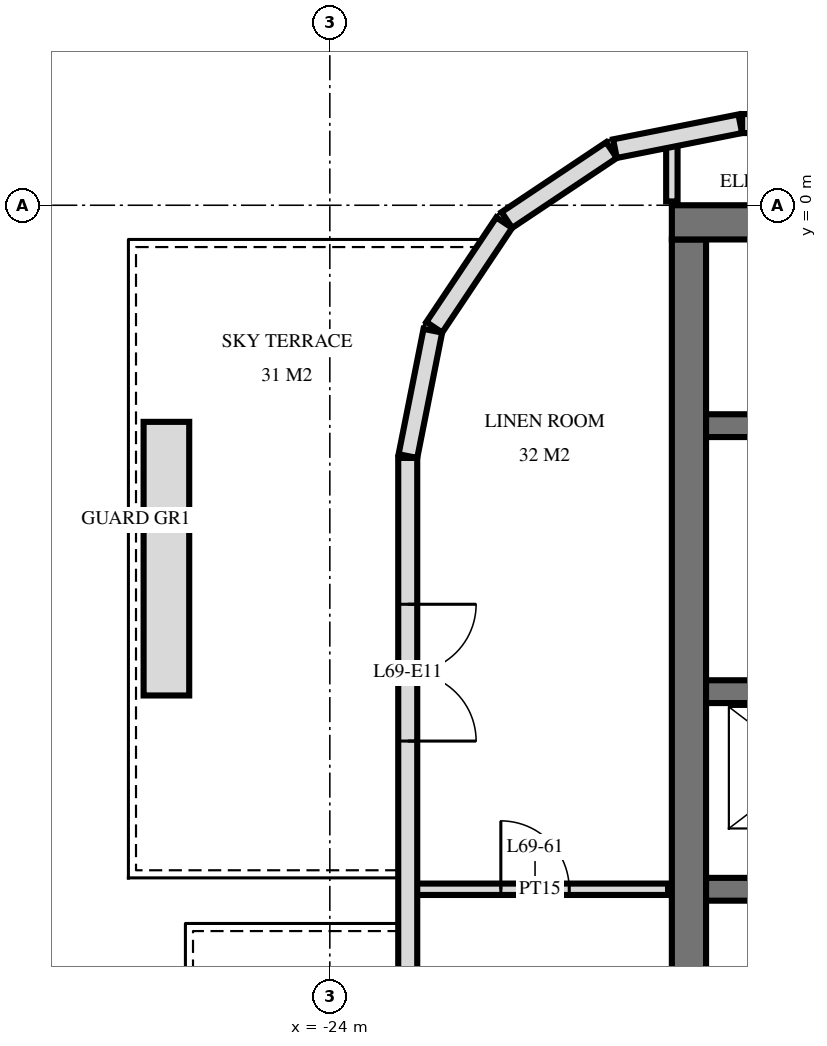
"""IFC4 building model, lengths in metres.
Left out: names, types, materials, properties, quantities, classifications, styles, units other than length and angle.
Written with IfcOpenShell. Run it as: python <this file> out.ifc"""

import sys

from ifc_helpers import new_model, si_unit, direction, frame, frame_2d, origin, place, context, subcontext, project, spatial, rectangle, extrude, element, fill, save


model = new_model("IFC4")
c1 = context("Model", 3, precision=1e-05, world=origin(), true_north=direction((0.0, 1.0)))
c2 = subcontext(c1, "Body", "Model", "MODEL_VIEW")
j1 = project(units=[si_unit("LENGTHUNIT", "METRE"), si_unit("PLANEANGLEUNIT", "RADIAN")], contexts=[c1])
p1 = place(None, origin())
s1 = spatial("IfcSite", under=j1, at=p1, CompositionType="ELEMENT")
p2 = place(p1, origin())
s2 = spatial("IfcBuilding", under=s1, at=p2, CompositionType="ELEMENT")
p3 = place(p2, frame((0.0, 0.0, 263.1)))
s3 = spatial("IfcBuildingStorey", under=s2, at=p3, CompositionType="ELEMENT", Elevation=263.1)
p4 = place(p3, frame((-19.5, -0.225, 0.0), z_axis=(0.0, 0.0, 1.0), x_axis=(1.0, 0.0, 0.0)))
e1 = element("IfcWall", 1, at=p4, inside=s3, PredefinedType="SHEAR", context=c2, shape_type="SweptSolid", body=[
    extrude(rectangle(XDim=9.5, YDim=0.45, at=frame_2d((4.75, 0.0))), origin(), (0.0, 0.0, 1.0), 3.5),
])
p5 = place(p3, frame((-19.275, -14.55, 0.0), z_axis=(0.0, 0.0, 1.0), x_axis=(0.0, 1.0, 0.0)))
e2 = element("IfcWall", 2, at=p5, inside=s3, PredefinedType="SHEAR", context=c2, shape_type="SweptSolid", body=[
    extrude(rectangle(XDim=14.1, YDim=0.45, at=frame_2d((7.05, 0.0))), origin(), (0.0, 0.0, 1.0), 3.5),
])
p6 = place(p3, frame((-19.05, -2.9, 0.0), z_axis=(0.0, 0.0, 1.0), x_axis=(1.0, 0.0, 0.0)))
e3 = element("IfcWall", 3, at=p6, inside=s3, PredefinedType="SHEAR", context=c2, shape_type="SweptSolid", body=[
    extrude(rectangle(XDim=8.7, YDim=0.3, at=frame_2d((4.35, 0.0))), origin(), (0.0, 0.0, 1.0), 3.5),
])
p7 = place(p6, frame((6.8, 0.0, 0.0)))
e4 = element("IfcOpeningElement", 4, at=p7, cuts=e3, PredefinedType="OPENING", context=c2, shape_type="SweptSolid", body=[
    extrude(rectangle(XDim=1.1, YDim=2.1, at=frame_2d((0.55, 1.05))), frame((0.0, 0.16, 0.0), z_axis=(0.0, -1.0, 0.0), x_axis=(1.0, 0.0, 0.0)), (0.0, 0.0, 1.0), 0.32),
])
p8 = place(p6, frame((3.8, 0.0, 0.0)))
e5 = element("IfcOpeningElement", 5, at=p8, cuts=e3, PredefinedType="OPENING", context=c2, shape_type="SweptSolid", body=[
    extrude(rectangle(XDim=1.1, YDim=2.1, at=frame_2d((0.55, 1.05))), frame((0.0, 0.16, 0.0), z_axis=(0.0, -1.0, 0.0), x_axis=(1.0, 0.0, 0.0)), (0.0, 0.0, 1.0), 0.32),
])
p9 = place(p6, frame((0.9, 0.0, 0.0)))
e6 = element("IfcOpeningElement", 6, at=p9, cuts=e3, PredefinedType="OPENING", context=c2, shape_type="SweptSolid", body=[
    extrude(rectangle(XDim=0.9, YDim=2.1, at=frame_2d((0.45, 1.05))), frame((0.0, 0.16, 0.0), z_axis=(0.0, -1.0, 0.0), x_axis=(1.0, 0.0, 0.0)), (0.0, 0.0, 1.0), 0.32),
])
p10 = place(p3, frame((-19.05, -6.4, 0.0), z_axis=(0.0, 0.0, 1.0), x_axis=(1.0, 0.0, 0.0)))
e7 = element("IfcWall", 7, at=p10, inside=s3, PredefinedType="SHEAR", context=c2, shape_type="SweptSolid", body=[
    extrude(rectangle(XDim=8.7, YDim=0.3, at=frame_2d((4.35, 0.0))), origin(), (0.0, 0.0, 1.0), 3.5),
])
p11 = place(p10, frame((0.8, 0.0, 0.0)))
e8 = element("IfcOpeningElement", 8, at=p11, cuts=e7, PredefinedType="OPENING", context=c2, shape_type="SweptSolid", body=[
    extrude(rectangle(XDim=1.1, YDim=2.1, at=frame_2d((0.55, 1.05))), frame((0.0, 0.16, 0.0), z_axis=(0.0, -1.0, 0.0), x_axis=(1.0, 0.0, 0.0)), (0.0, 0.0, 1.0), 0.32),
])
p12 = place(p3, frame((-19.05, -9.0, 0.0), z_axis=(0.0, 0.0, 1.0), x_axis=(1.0, 0.0, 0.0)))
e9 = element("IfcWall", 9, at=p12, inside=s3, PredefinedType="SHEAR", context=c2, shape_type="SweptSolid", body=[
    extrude(rectangle(XDim=8.7, YDim=0.3, at=frame_2d((4.35, 0.0))), origin(), (0.0, 0.0, 1.0), 3.5),
])
p13 = place(p12, frame((3.8, 0.0, 0.0)))
e10 = element("IfcOpeningElement", 10, at=p13, cuts=e9, PredefinedType="OPENING", context=c2, shape_type="SweptSolid", body=[
    extrude(rectangle(XDim=1.1, YDim=2.1, at=frame_2d((0.55, 1.05))), frame((0.0, 0.16, 0.0), z_axis=(0.0, -1.0, 0.0), x_axis=(1.0, 0.0, 0.0)), (0.0, 0.0, 1.0), 0.32),
])
p14 = place(p3, frame((18.575, 1.075, 0.0), z_axis=(0.0, 0.0, 1.0), x_axis=(-1.0, 0.0, 0.0)))
e11 = element("IfcWall", 11, at=p14, inside=s3, PredefinedType="SOLIDWALL", context=c2, shape_type="SweptSolid", body=[
    extrude(rectangle(XDim=37.151, YDim=0.25, at=frame_2d((18.575, 0.0))), origin(), (0.0, 0.0, 1.0), 3.22),
])
p15 = place(p14, frame((9.275, 0.0, 0.9)))
e12 = element("IfcOpeningElement", 12, at=p15, cuts=e11, PredefinedType="OPENING", context=c2, shape_type="SweptSolid", body=[
    extrude(rectangle(XDim=2.4, YDim=1.5, at=frame_2d((1.2, 0.75))), frame((0.0, 0.135, 0.0), z_axis=(0.0, -1.0, 0.0), x_axis=(1.0, 0.0, 0.0)), (0.0, 0.0, 1.0), 0.27),
])
p16 = place(p14, frame((15.275, 0.0, 0.9)))
e13 = element("IfcOpeningElement", 13, at=p16, cuts=e11, PredefinedType="OPENING", context=c2, shape_type="SweptSolid", body=[
    extrude(rectangle(XDim=2.4, YDim=1.5, at=frame_2d((1.2, 0.75))), frame((0.0, 0.135, 0.0), z_axis=(0.0, -1.0, 0.0), x_axis=(1.0, 0.0, 0.0)), (0.0, 0.0, 1.0), 0.27),
])
p17 = place(p14, frame((25.125, 0.0, 0.9)))
e14 = element("IfcOpeningElement", 14, at=p17, cuts=e11, PredefinedType="OPENING", context=c2, shape_type="SweptSolid", body=[
    extrude(rectangle(XDim=2.4, YDim=1.5, at=frame_2d((1.2, 0.75))), frame((0.0, 0.135, 0.0), z_axis=(0.0, -1.0, 0.0), x_axis=(1.0, 0.0, 0.0)), (0.0, 0.0, 1.0), 0.27),
])
p18 = place(p3, frame((-18.6, 1.073, 0.0), z_axis=(0.0, 0.0, 1.0), x_axis=(-0.980797896849, -0.195026884138, 0.0)))
e15 = element("IfcWall", 15, at=p18, inside=s3, PredefinedType="SOLIDWALL", context=c2, shape_type="SweptSolid", body=[
    extrude(rectangle(XDim=1.681, YDim=0.25, at=frame_2d((0.841, 0.0))), origin(), (0.0, 0.0, 1.0), 3.22),
])
for number, where, z_axis, x_axis in (
    (16, (-20.294, 0.726, 0.0), (0.0, 0.0, 1.0), (-0.831, -0.556, 0.0)),
    (17, (-21.706, -0.229, 0.0), (0.0, 0.0, 1.0), (-0.556, -0.831, 0.0)),
):
    element("IfcWall", number, at=place(p3, frame(where, z_axis=z_axis, x_axis=x_axis)), inside=s3, PredefinedType="SOLIDWALL", context=c2, shape_type="SweptSolid", body=[
        extrude(rectangle(XDim=1.656, YDim=0.25, at=frame_2d((0.828, 0.0))), origin(), (0.0, 0.0, 1.0), 3.22),
    ])
p19 = place(p3, frame((-22.645, -1.651, 0.0), z_axis=(0.0, 0.0, 1.0), x_axis=(-0.19513878023, -0.980775640221, 0.0)))
e18 = element("IfcWall", 18, at=p19, inside=s3, PredefinedType="SOLIDWALL", context=c2, shape_type="SweptSolid", body=[
    extrude(rectangle(XDim=1.681, YDim=0.25, at=frame_2d((0.841, 0.0))), origin(), (0.0, 0.0, 1.0), 3.22),
])
p20 = place(p3, frame((-22.975, -3.325, 0.0), z_axis=(0.0, 0.0, 1.0), x_axis=(0.0, -1.0, 0.0)))
e19 = element("IfcWall", 19, at=p20, inside=s3, PredefinedType="SOLIDWALL", context=c2, shape_type="SweptSolid", body=[
    extrude(rectangle(XDim=25.951, YDim=0.25, at=frame_2d((12.975, 0.0))), origin(), (0.0, 0.0, 1.0), 3.22),
])
p21 = place(p20, frame((1.925, 0.0, 0.0)))
e20 = element("IfcOpeningElement", 20, at=p21, cuts=e19, PredefinedType="OPENING", context=c2, shape_type="SweptSolid", body=[
    extrude(rectangle(XDim=1.8, YDim=2.4, at=frame_2d((0.9, 1.2))), frame((0.0, 0.135, 0.0), z_axis=(0.0, -1.0, 0.0), x_axis=(1.0, 0.0, 0.0)), (0.0, 0.0, 1.0), 0.27),
])
p22 = place(p20, frame((7.975, 0.0, 0.0)))
e21 = element("IfcOpeningElement", 21, at=p22, cuts=e19, PredefinedType="OPENING", context=c2, shape_type="SweptSolid", body=[
    extrude(rectangle(XDim=1.8, YDim=2.4, at=frame_2d((0.9, 1.2))), frame((0.0, 0.135, 0.0), z_axis=(0.0, -1.0, 0.0), x_axis=(1.0, 0.0, 0.0)), (0.0, 0.0, 1.0), 0.27),
])
p23 = place(p20, frame((12.575, 0.0, 0.9)))
e22 = element("IfcOpeningElement", 22, at=p23, cuts=e19, PredefinedType="OPENING", context=c2, shape_type="SweptSolid", body=[
    extrude(rectangle(XDim=1.2, YDim=1.5, at=frame_2d((0.6, 0.75))), frame((0.0, 0.135, 0.0), z_axis=(0.0, -1.0, 0.0), x_axis=(1.0, 0.0, 0.0)), (0.0, 0.0, 1.0), 0.27),
])
p24 = place(p20, frame((15.775, 0.0, 0.0)))
e23 = element("IfcOpeningElement", 23, at=p24, cuts=e19, PredefinedType="OPENING", context=c2, shape_type="SweptSolid", body=[
    extrude(rectangle(XDim=1.8, YDim=2.4, at=frame_2d((0.9, 1.2))), frame((0.0, 0.135, 0.0), z_axis=(0.0, -1.0, 0.0), x_axis=(1.0, 0.0, 0.0)), (0.0, 0.0, 1.0), 0.27),
])
p25 = place(p20, frame((21.075, 0.0, 0.0)))
e24 = element("IfcOpeningElement", 24, at=p25, cuts=e19, PredefinedType="OPENING", context=c2, shape_type="SweptSolid", body=[
    extrude(rectangle(XDim=1.8, YDim=2.4, at=frame_2d((0.9, 1.2))), frame((0.0, 0.135, 0.0), z_axis=(0.0, -1.0, 0.0), x_axis=(1.0, 0.0, 0.0)), (0.0, 0.0, 1.0), 0.27),
])
p26 = place(p20, frame((23.825, 0.0, 0.9)))
e25 = element("IfcOpeningElement", 25, at=p26, cuts=e19, PredefinedType="OPENING", context=c2, shape_type="SweptSolid", body=[
    extrude(rectangle(XDim=1.8, YDim=1.5, at=frame_2d((0.9, 0.75))), frame((0.0, 0.135, 0.0), z_axis=(0.0, -1.0, 0.0), x_axis=(1.0, 0.0, 0.0)), (0.0, 0.0, 1.0), 0.27),
])
p27 = place(p3, frame((-26.15, -6.45, 0.0), z_axis=(0.0, 0.0, 1.0), x_axis=(0.0, 1.0, 0.0)))
e26 = element("IfcWall", 26, at=p27, inside=s3, PredefinedType="USERDEFINED", context=c2, shape_type="SweptSolid", body=[
    extrude(rectangle(XDim=3.6, YDim=0.6, at=frame_2d((1.8, 0.0))), origin(), (0.0, 0.0, 1.0), 0.65),
])
p28 = place(p3, frame((-19.5, 0.05, 0.0), z_axis=(0.0, 0.0, 1.0), x_axis=(0.0, 1.0, 0.0)))
e27 = element("IfcWall", 27, at=p28, inside=s3, PredefinedType="PARTITIONING", context=c2, shape_type="SweptSolid", body=[
    extrude(rectangle(XDim=0.787, YDim=0.15, at=frame_2d((0.394, 0.0))), origin(), (0.0, 0.0, 1.0), 3.22),
])
p29 = place(p3, frame((-22.92, -9.0, 0.0), z_axis=(0.0, 0.0, 1.0), x_axis=(1.0, 0.0, 0.0)))
e28 = element("IfcWall", 28, at=p29, inside=s3, PredefinedType="PARTITIONING", context=c2, shape_type="SweptSolid", body=[
    extrude(rectangle(XDim=3.37, YDim=0.15, at=frame_2d((1.685, 0.0))), origin(), (0.0, 0.0, 1.0), 3.22),
])
p30 = place(p29, frame((1.17, 0.0, 0.0)))
e29 = element("IfcOpeningElement", 29, at=p30, cuts=e28, PredefinedType="OPENING", context=c2, shape_type="SweptSolid", body=[
    extrude(rectangle(XDim=0.9, YDim=2.1, at=frame_2d((0.45, 1.05))), frame((0.0, 0.085, 0.0), z_axis=(0.0, -1.0, 0.0), x_axis=(1.0, 0.0, 0.0)), (0.0, 0.0, 1.0), 0.17),
])
p31 = place(p21, origin())
e30 = element("IfcDoor", 30, at=p31, inside=s3, OperationType="DOUBLE_DOOR_SINGLE_SWING", PredefinedType="DOOR", context=c2, shape_type="SweptSolid", body=[
    extrude(rectangle(XDim=1.8, YDim=2.4, at=frame_2d((0.9, 1.2))), frame((0.0, 0.025, 0.0), z_axis=(0.0, -1.0, 0.0), x_axis=(1.0, 0.0, 0.0)), (0.0, 0.0, 1.0), 0.05),
])
fill(e20, e30)
p32 = place(p30, origin())
e31 = element("IfcDoor", 31, at=p32, inside=s3, OperationType="SINGLE_SWING_RIGHT", PredefinedType="DOOR", context=c2, shape_type="SweptSolid", body=[
    extrude(rectangle(XDim=0.9, YDim=2.1, at=frame_2d((0.45, 1.05))), frame((0.0, 0.025, 0.0), z_axis=(0.0, -1.0, 0.0), x_axis=(1.0, 0.0, 0.0)), (0.0, 0.0, 1.0), 0.05),
])
fill(e29, e31)
save(model, sys.argv[1])
